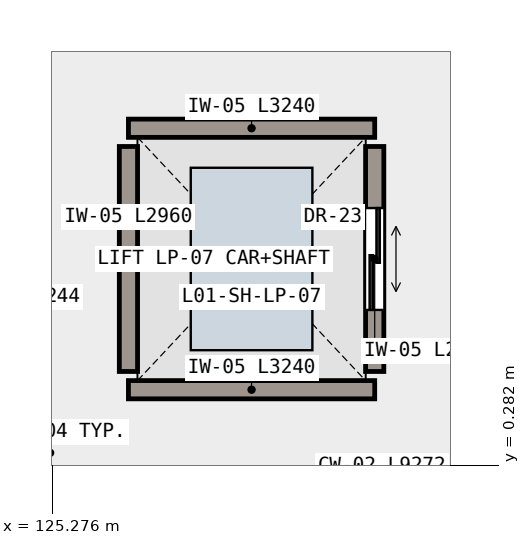
"""IFC4 building model, lengths in metres.
Left out: names, types, materials, properties, quantities, classifications, styles, units other than length and angle.
Written with IfcOpenShell. Run it as: python <this file> out.ifc"""

import sys

from ifc_helpers import new_model, si_unit, direction, frame, frame_2d, origin, place, context, subcontext, project, spatial, rectangle, extrude, element, fill, save


model = new_model("IFC4")
c1 = context("Model", 3, precision=1e-05, world=origin(), true_north=direction((0.0, 1.0)))
c2 = subcontext(c1, "Body", "Model", "MODEL_VIEW")
j1 = project(units=[si_unit("LENGTHUNIT", "METRE"), si_unit("PLANEANGLEUNIT", "RADIAN")], contexts=[c1])
p1 = place(None, origin())
s1 = spatial("IfcSite", under=j1, at=p1, CompositionType="ELEMENT")
p2 = place(p1, origin())
s2 = spatial("IfcBuilding", under=s1, at=p2, CompositionType="ELEMENT")
p3 = place(p2, frame((0.0, 0.0, 5.4)))
s3 = spatial("IfcBuildingStorey", under=s2, at=p3, CompositionType="ELEMENT", Elevation=5.4)
for number, where, z_axis, x_axis in (
    (1, (129.52, 1.28, 0.0), (0.0, 0.0, 1.0), (-1.0, 0.0, 0.0)),
    (2, (126.28, 4.72, 0.0), (0.0, 0.0, 1.0), (1.0, 0.0, 0.0)),
):
    element("IfcWall", number, at=place(p3, frame(where, z_axis=z_axis, x_axis=x_axis)), inside=s3, PredefinedType="SHEAR", context=c2, shape_type="SweptSolid", body=[
        extrude(rectangle(XDim=3.24, YDim=0.24, at=frame_2d((1.62, 0.0))), origin(), (0.0, 0.0, 1.0), 4.54),
    ])
p4 = place(p3, frame((126.28, 1.52, 0.0), z_axis=(0.0, 0.0, 1.0), x_axis=(0.0, 1.0, 0.0)))
e3 = element("IfcWall", 3, at=p4, inside=s3, PredefinedType="SHEAR", context=c2, shape_type="SweptSolid", body=[
    extrude(rectangle(XDim=2.96, YDim=0.24, at=frame_2d((1.48, 0.0))), origin(), (0.0, 0.0, 1.0), 4.54),
])
p5 = place(p3, frame((129.52, 4.48, 0.0), z_axis=(0.0, 0.0, 1.0), x_axis=(0.0, -1.0, 0.0)))
e4 = element("IfcWall", 4, at=p5, inside=s3, PredefinedType="SHEAR", context=c2, shape_type="SweptSolid", body=[
    extrude(rectangle(XDim=2.96, YDim=0.24, at=frame_2d((1.48, 0.0))), origin(), (0.0, 0.0, 1.0), 4.54),
])
p6 = place(p5, frame((0.81, 0.0, 0.0)))
e5 = element("IfcOpeningElement", 5, at=p6, cuts=e4, PredefinedType="OPENING", context=c2, shape_type="SweptSolid", body=[
    extrude(rectangle(XDim=1.34, YDim=2.18, at=frame_2d((0.67, 1.09))), frame((0.0, 0.13, 0.0), z_axis=(0.0, -1.0, 0.0), x_axis=(1.0, 0.0, 0.0)), (0.0, 0.0, 1.0), 0.26),
])
p7 = place(p6, origin())
e6 = element("IfcDoor", 6, at=p7, inside=s3, OperationType="DOUBLE_DOOR_SLIDING", PredefinedType="DOOR", context=c2, shape_type="SweptSolid", body=[
    extrude(rectangle(XDim=1.34, YDim=2.18, at=frame_2d((0.67, 1.09))), frame((0.0, 0.025, 0.0), z_axis=(0.0, -1.0, 0.0), x_axis=(1.0, 0.0, 0.0)), (0.0, 0.0, 1.0), 0.05),
])
fill(e5, e6)
save(model, sys.argv[1])
